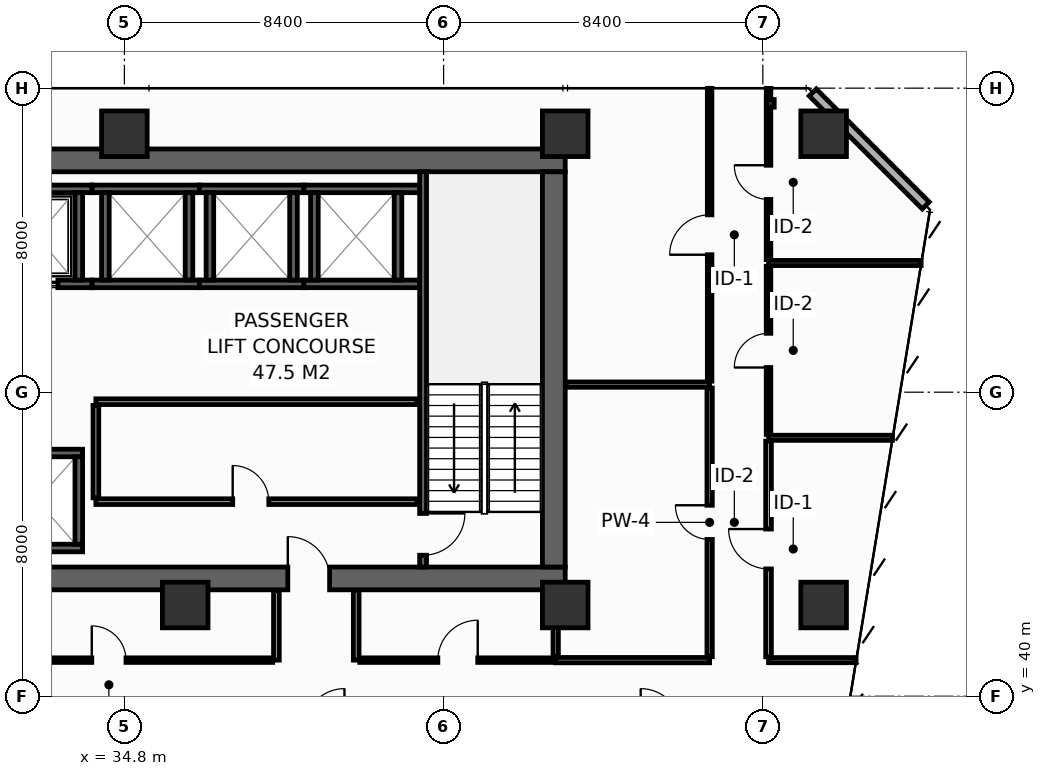
"""IFC4 building model, lengths in metres.
Left out: names, types, materials, properties, quantities, classifications, styles, units other than length and angle.
Written with IfcOpenShell. Run it as: python <this file> out.ifc"""

import sys

from ifc_helpers import new_model, si_unit, direction, frame, frame_2d, origin, origin_2d, place, context, subcontext, project, spatial, rectangle, hollow_rectangle, extrude, element, fill, save


model = new_model("IFC4")
c1 = context("Model", 3, precision=1e-05, world=origin(), true_north=direction((0.0, 1.0)))
c2 = subcontext(c1, "Body", "Model", "MODEL_VIEW")
j1 = project(units=[si_unit("LENGTHUNIT", "METRE"), si_unit("PLANEANGLEUNIT", "RADIAN")], contexts=[c1])
p1 = place(None, origin())
s1 = spatial("IfcSite", under=j1, at=p1, CompositionType="ELEMENT")
p2 = place(p1, origin())
s2 = spatial("IfcBuilding", under=s1, at=p2, CompositionType="ELEMENT")
p3 = place(p2, frame((0.0, 0.0, 42.8)))
s3 = spatial("IfcBuildingStorey", under=s2, at=p3, CompositionType="ELEMENT", Elevation=42.8)
p4 = place(p3, frame((13.5, 43.1, 0.0), z_axis=(0.0, 0.0, 1.0), x_axis=(1.0, 0.0, 0.0)))
e1 = element("IfcWall", 1, at=p4, inside=s3, PredefinedType="SHEAR", context=c2, shape_type="SweptSolid", body=[
    extrude(rectangle(XDim=32.9, YDim=0.6, at=frame_2d((16.45, 0.0))), origin(), (0.0, 0.0, 1.0), 4.15),
])
p5 = place(p4, frame((5.4, 0.0, 0.0)))
e2 = element("IfcOpeningElement", 2, at=p5, cuts=e1, PredefinedType="OPENING", context=c2, shape_type="SweptSolid", body=[
    extrude(rectangle(XDim=1.1, YDim=2.15, at=frame_2d((0.55, 1.075))), frame((0.0, 0.31, 0.0), z_axis=(0.0, -1.0, 0.0), x_axis=(1.0, 0.0, 0.0)), (0.0, 0.0, 1.0), 0.62),
])
p6 = place(p4, frame((25.6, 0.0, 0.0)))
e3 = element("IfcOpeningElement", 3, at=p6, cuts=e1, PredefinedType="OPENING", context=c2, shape_type="SweptSolid", body=[
    extrude(rectangle(XDim=1.1, YDim=2.15, at=frame_2d((0.55, 1.075))), frame((0.0, 0.31, 0.0), z_axis=(0.0, -1.0, 0.0), x_axis=(1.0, 0.0, 0.0)), (0.0, 0.0, 1.0), 0.62),
])
p7 = place(p3, frame((13.5, 54.1, 0.0), z_axis=(0.0, 0.0, 1.0), x_axis=(1.0, 0.0, 0.0)))
e4 = element("IfcWall", 4, at=p7, inside=s3, PredefinedType="SHEAR", context=c2, shape_type="SweptSolid", body=[
    extrude(rectangle(XDim=32.9, YDim=0.6, at=frame_2d((16.45, 0.0))), origin(), (0.0, 0.0, 1.0), 4.15),
])
p8 = place(p3, frame((46.1, 43.4, 0.0), z_axis=(0.0, 0.0, 1.0), x_axis=(0.0, 1.0, 0.0)))
e5 = element("IfcWall", 5, at=p8, inside=s3, PredefinedType="SHEAR", context=c2, shape_type="SweptSolid", body=[
    extrude(rectangle(XDim=10.4, YDim=0.6, at=frame_2d((5.2, 0.0))), origin(), (0.0, 0.0, 1.0), 4.15),
])
for number, where, z_axis, x_axis in (
    (6, (34.8, 54.8, 0.0), (0.0, 0.0, 1.0), (1.0, 0.0, 0.0)),
    (7, (46.4, 54.8, 0.0), (0.0, 0.0, 1.0), (1.0, 0.0, 0.0)),
    (8, (53.2, 54.8, 0.0), (0.0, 0.0, 1.0), (1.0, 0.0, 0.0)),
    (9, (36.4, 42.4, 0.0), (0.0, 0.0, 1.0), (1.0, 0.0, 0.0)),
    (10, (46.4, 42.4, 0.0), (0.0, 0.0, 1.0), (1.0, 0.0, 0.0)),
    (11, (53.2, 42.4, 0.0), (0.0, 0.0, 1.0), (1.0, 0.0, 0.0)),
):
    element("IfcColumn", number, at=place(p3, frame(where, z_axis=z_axis, x_axis=x_axis)), inside=s3, PredefinedType="COLUMN", context=c2, shape_type="SweptSolid", body=[
        extrude(hollow_rectangle(XDim=1.2, YDim=1.2, WallThickness=0.055, at=origin_2d()), origin(), (0.0, 0.0, 1.0), 4.4),
    ])
p9 = place(p3, frame((51.8, 55.6, 0.0), z_axis=(0.0, 0.0, 1.0), x_axis=(1.0, 0.0, 0.0)))
e12 = element("IfcColumn", 12, at=p9, inside=s3, PredefinedType="PILASTER", context=c2, shape_type="SweptSolid", body=[
    extrude(hollow_rectangle(XDim=0.2, YDim=0.2, WallThickness=0.01, at=origin_2d()), origin(), (0.0, 0.0, 1.0), 4.4),
])
p10 = place(p3, frame((31.125, 50.85, 0.0), z_axis=(0.0, 0.0, 1.0), x_axis=(1.0, 0.0, 0.0)))
e13 = element("IfcWall", 13, at=p10, inside=s3, PredefinedType="SHEAR", context=c2, shape_type="SweptSolid", body=[
    extrude(rectangle(XDim=2.825, YDim=0.2, at=frame_2d((1.413, 0.0))), origin(), (0.0, 0.0, 1.0), 4.15),
])
p11 = place(p10, frame((0.825, 0.0, 0.0)))
e14 = element("IfcOpeningElement", 14, at=p11, cuts=e13, PredefinedType="OPENING", context=c2, shape_type="SweptSolid", body=[
    extrude(rectangle(XDim=1.1, YDim=2.2, at=frame_2d((0.55, 1.1))), frame((0.0, 0.11, 0.0), z_axis=(0.0, -1.0, 0.0), x_axis=(1.0, 0.0, 0.0)), (0.0, 0.0, 1.0), 0.22),
])
p12 = place(p3, frame((31.125, 53.35, 0.0), z_axis=(0.0, 0.0, 1.0), x_axis=(1.0, 0.0, 0.0)))
e15 = element("IfcWall", 15, at=p12, inside=s3, PredefinedType="SHEAR", context=c2, shape_type="SweptSolid", body=[
    extrude(rectangle(XDim=2.825, YDim=0.2, at=frame_2d((1.413, 0.0))), origin(), (0.0, 0.0, 1.0), 4.15),
])
p13 = place(p3, frame((33.6, 50.95, 0.0), z_axis=(0.0, 0.0, 1.0), x_axis=(0.0, 1.0, 0.0)))
e16 = element("IfcWall", 16, at=p13, inside=s3, PredefinedType="SHEAR", context=c2, shape_type="SweptSolid", body=[
    extrude(rectangle(XDim=2.3, YDim=0.2, at=frame_2d((1.15, 0.0))), origin(), (0.0, 0.0, 1.0), 4.15),
])
for number, where, z_axis, x_axis in (
    (17, (31.125, 43.9, 0.0), (0.0, 0.0, 1.0), (1.0, 0.0, 0.0)),
    (18, (31.125, 46.4, 0.0), (0.0, 0.0, 1.0), (1.0, 0.0, 0.0)),
):
    element("IfcWall", number, at=place(p3, frame(where, z_axis=z_axis, x_axis=x_axis)), inside=s3, PredefinedType="SHEAR", context=c2, shape_type="SweptSolid", body=[
        extrude(rectangle(XDim=2.575, YDim=0.2, at=frame_2d((1.288, 0.0))), origin(), (0.0, 0.0, 1.0), 4.15),
    ])
p14 = place(p3, frame((33.6, 44.0, 0.0), z_axis=(0.0, 0.0, 1.0), x_axis=(0.0, 1.0, 0.0)))
e19 = element("IfcWall", 19, at=p14, inside=s3, PredefinedType="SHEAR", context=c2, shape_type="SweptSolid", body=[
    extrude(rectangle(XDim=2.3, YDim=0.2, at=frame_2d((1.15, 0.0))), origin(), (0.0, 0.0, 1.0), 4.15),
])
for number, where, z_axis, x_axis in (
    (20, (33.95, 50.85, 0.0), (0.0, 0.0, 1.0), (1.0, 0.0, 0.0)),
    (21, (33.95, 53.35, 0.0), (0.0, 0.0, 1.0), (1.0, 0.0, 0.0)),
):
    element("IfcWall", number, at=place(p3, frame(where, z_axis=z_axis, x_axis=x_axis)), inside=s3, PredefinedType="SHEAR", context=c2, shape_type="SweptSolid", body=[
        extrude(rectangle(XDim=2.825, YDim=0.2, at=frame_2d((1.413, 0.0))), origin(), (0.0, 0.0, 1.0), 4.15),
    ])
for number, where, z_axis, x_axis in (
    (22, (34.3, 50.95, 0.0), (0.0, 0.0, 1.0), (0.0, 1.0, 0.0)),
    (23, (36.5, 50.95, 0.0), (0.0, 0.0, 1.0), (0.0, 1.0, 0.0)),
):
    element("IfcWall", number, at=place(p3, frame(where, z_axis=z_axis, x_axis=x_axis)), inside=s3, PredefinedType="SHEAR", context=c2, shape_type="SweptSolid", body=[
        extrude(rectangle(XDim=2.3, YDim=0.2, at=frame_2d((1.15, 0.0))), origin(), (0.0, 0.0, 1.0), 4.15),
    ])
for number, where, z_axis, x_axis in (
    (24, (36.775, 50.85, 0.0), (0.0, 0.0, 1.0), (1.0, 0.0, 0.0)),
    (25, (36.775, 53.35, 0.0), (0.0, 0.0, 1.0), (1.0, 0.0, 0.0)),
):
    element("IfcWall", number, at=place(p3, frame(where, z_axis=z_axis, x_axis=x_axis)), inside=s3, PredefinedType="SHEAR", context=c2, shape_type="SweptSolid", body=[
        extrude(rectangle(XDim=2.75, YDim=0.2, at=frame_2d((1.375, 0.0))), origin(), (0.0, 0.0, 1.0), 4.15),
    ])
for number, where, z_axis, x_axis in (
    (26, (37.05, 50.95, 0.0), (0.0, 0.0, 1.0), (0.0, 1.0, 0.0)),
    (27, (39.25, 50.95, 0.0), (0.0, 0.0, 1.0), (0.0, 1.0, 0.0)),
):
    element("IfcWall", number, at=place(p3, frame(where, z_axis=z_axis, x_axis=x_axis)), inside=s3, PredefinedType="SHEAR", context=c2, shape_type="SweptSolid", body=[
        extrude(rectangle(XDim=2.3, YDim=0.2, at=frame_2d((1.15, 0.0))), origin(), (0.0, 0.0, 1.0), 4.15),
    ])
for number, where, z_axis, x_axis in (
    (28, (39.525, 50.85, 0.0), (0.0, 0.0, 1.0), (1.0, 0.0, 0.0)),
    (29, (39.525, 53.35, 0.0), (0.0, 0.0, 1.0), (1.0, 0.0, 0.0)),
):
    element("IfcWall", number, at=place(p3, frame(where, z_axis=z_axis, x_axis=x_axis)), inside=s3, PredefinedType="SHEAR", context=c2, shape_type="SweptSolid", body=[
        extrude(rectangle(XDim=3.045, YDim=0.2, at=frame_2d((1.522, 0.0))), origin(), (0.0, 0.0, 1.0), 4.15),
    ])
for number, where, z_axis, x_axis in (
    (30, (39.8, 50.95, 0.0), (0.0, 0.0, 1.0), (0.0, 1.0, 0.0)),
    (31, (42.0, 50.95, 0.0), (0.0, 0.0, 1.0), (0.0, 1.0, 0.0)),
):
    element("IfcWall", number, at=place(p3, frame(where, z_axis=z_axis, x_axis=x_axis)), inside=s3, PredefinedType="SHEAR", context=c2, shape_type="SweptSolid", body=[
        extrude(rectangle(XDim=2.3, YDim=0.2, at=frame_2d((1.15, 0.0))), origin(), (0.0, 0.0, 1.0), 4.15),
    ])
p15 = place(p3, frame((42.66, 53.8, 0.0), z_axis=(0.0, 0.0, 1.0), x_axis=(0.0, -1.0, 0.0)))
e32 = element("IfcWall", 32, at=p15, inside=s3, PredefinedType="SHEAR", context=c2, shape_type="SweptSolid", body=[
    extrude(rectangle(XDim=10.4, YDim=0.18, at=frame_2d((5.2, 0.0))), origin(), (0.0, 0.0, 1.0), 4.15),
])
p16 = place(p15, frame((8.99, 0.0, 0.0)))
e33 = element("IfcOpeningElement", 33, at=p16, cuts=e32, PredefinedType="OPENING", context=c2, shape_type="SweptSolid", body=[
    extrude(rectangle(XDim=1.1, YDim=2.15, at=frame_2d((0.55, 1.075))), frame((0.0, 0.1, 0.0), z_axis=(0.0, -1.0, 0.0), x_axis=(1.0, 0.0, 0.0)), (0.0, 0.0, 1.0), 0.2),
])
p17 = place(p3, frame((34.05, 45.12, 0.0), z_axis=(0.0, 0.0, 1.0), x_axis=(1.0, 0.0, 0.0)))
e34 = element("IfcWall", 34, at=p17, inside=s3, PredefinedType="PARTITIONING", context=c2, shape_type="SweptSolid", body=[
    extrude(rectangle(XDim=8.45, YDim=0.15, at=frame_2d((4.225, 0.0))), origin(), (0.0, 0.0, 1.0), 4.15),
])
p18 = place(p17, frame((3.6, 0.0, 0.0)))
e35 = element("IfcOpeningElement", 35, at=p18, cuts=e34, PredefinedType="OPENING", context=c2, shape_type="SweptSolid", body=[
    extrude(rectangle(XDim=0.95, YDim=2.15, at=frame_2d((0.475, 1.075))), frame((0.0, 0.085, 0.0), z_axis=(0.0, -1.0, 0.0), x_axis=(1.0, 0.0, 0.0)), (0.0, 0.0, 1.0), 0.17),
])
p19 = place(p3, frame((34.05, 47.75, 0.0), z_axis=(0.0, 0.0, 1.0), x_axis=(1.0, 0.0, 0.0)))
e36 = element("IfcWall", 36, at=p19, inside=s3, PredefinedType="PARTITIONING", context=c2, shape_type="SweptSolid", body=[
    extrude(rectangle(XDim=8.45, YDim=0.15, at=frame_2d((4.225, 0.0))), origin(), (0.0, 0.0, 1.0), 4.15),
])
p20 = place(p3, frame((34.05, 45.22, 0.0), z_axis=(0.0, 0.0, 1.0), x_axis=(0.0, 1.0, 0.0)))
e37 = element("IfcWall", 37, at=p20, inside=s3, PredefinedType="PARTITIONING", context=c2, shape_type="SweptSolid", body=[
    extrude(rectangle(XDim=2.43, YDim=0.15, at=frame_2d((1.215, 0.0))), origin(), (0.0, 0.0, 1.0), 4.15),
])
p21 = place(p3, frame((55.887, 52.913, 0.0), z_axis=(0.0, 0.0, 1.0), x_axis=(-0.707106781187, 0.707106781187, 0.0)))
e38 = element("IfcWall", 38, at=p21, inside=s3, PredefinedType="STANDARD", context=c2, shape_type="SweptSolid", body=[
    extrude(rectangle(XDim=4.206, YDim=0.26, at=frame_2d((2.103, 0.0))), origin(), (0.0, 0.0, 1.0), 4.15),
])
p22 = place(p3, frame((46.15, 40.95, 0.0), z_axis=(0.0, 0.0, 1.0), x_axis=(1.0, 0.0, 0.0)))
e39 = element("IfcWall", 39, at=p22, inside=s3, PredefinedType="PARTITIONING", context=c2, shape_type="SweptSolid", body=[
    extrude(rectangle(XDim=4.05, YDim=0.14, at=frame_2d((2.025, 0.0))), origin(), (0.0, 0.0, 1.0), 4.15),
])
p23 = place(p3, frame((46.15, 41.04, 0.0), z_axis=(0.0, 0.0, 1.0), x_axis=(0.0, 1.0, 0.0)))
e40 = element("IfcWall", 40, at=p23, inside=s3, PredefinedType="PARTITIONING", context=c2, shape_type="SweptSolid", body=[
    extrude(rectangle(XDim=1.74, YDim=0.14, at=frame_2d((0.87, 0.0))), origin(), (0.0, 0.0, 1.0), 4.15),
])
p24 = place(p3, frame((46.42, 48.2, 0.0), z_axis=(0.0, 0.0, 1.0), x_axis=(1.0, 0.0, 0.0)))
e41 = element("IfcWall", 41, at=p24, inside=s3, PredefinedType="PARTITIONING", context=c2, shape_type="SweptSolid", body=[
    extrude(rectangle(XDim=3.78, YDim=0.14, at=frame_2d((1.89, 0.0))), origin(), (0.0, 0.0, 1.0), 4.15),
])
p25 = place(p3, frame((50.2, 41.04, 0.0), z_axis=(0.0, 0.0, 1.0), x_axis=(0.0, 1.0, 0.0)))
e42 = element("IfcWall", 42, at=p25, inside=s3, PredefinedType="PARTITIONING", context=c2, shape_type="SweptSolid", body=[
    extrude(rectangle(XDim=7.07, YDim=0.14, at=frame_2d((3.535, 0.0))), origin(), (0.0, 0.0, 1.0), 3.335),
])
p26 = place(p25, frame((3.085, 0.0, 0.0)))
e43 = element("IfcOpeningElement", 43, at=p26, cuts=e42, PredefinedType="OPENING", context=c2, shape_type="SweptSolid", body=[
    extrude(rectangle(XDim=0.9, YDim=2.1, at=frame_2d((0.45, 1.05))), frame((0.0, 0.08, 0.0), z_axis=(0.0, -1.0, 0.0), x_axis=(1.0, 0.0, 0.0)), (0.0, 0.0, 1.0), 0.16),
])
p27 = place(p3, frame((50.2, 48.29, 0.0), z_axis=(0.0, 0.0, 1.0), x_axis=(0.0, 1.0, 0.0)))
e44 = element("IfcWall", 44, at=p27, inside=s3, PredefinedType="PARTITIONING", context=c2, shape_type="SweptSolid", body=[
    extrude(rectangle(XDim=7.705, YDim=0.12, at=frame_2d((3.853, 0.0))), origin(), (0.0, 0.0, 1.0), 3.435),
])
p28 = place(p27, frame((3.327, 0.0, 0.0)))
e45 = element("IfcOpeningElement", 45, at=p28, cuts=e44, PredefinedType="OPENING", context=c2, shape_type="SweptSolid", body=[
    extrude(rectangle(XDim=1.05, YDim=2.15, at=frame_2d((0.525, 1.075))), frame((0.0, 0.07, 0.0), z_axis=(0.0, -1.0, 0.0), x_axis=(1.0, 0.0, 0.0)), (0.0, 0.0, 1.0), 0.14),
])
p29 = place(p3, frame((51.75, 40.95, 0.0), z_axis=(0.0, 0.0, 1.0), x_axis=(1.0, 0.0, 0.0)))
e46 = element("IfcWall", 46, at=p29, inside=s3, PredefinedType="PARTITIONING", context=c2, shape_type="SweptSolid", body=[
    extrude(rectangle(XDim=2.303, YDim=0.135, at=frame_2d((1.151, 0.0))), origin(), (0.0, 0.0, 1.0), 3.635),
])
p30 = place(p3, frame((51.75, 46.8, 0.0), z_axis=(0.0, 0.0, 1.0), x_axis=(1.0, 0.0, 0.0)))
e47 = element("IfcWall", 47, at=p30, inside=s3, PredefinedType="PARTITIONING", context=c2, shape_type="SweptSolid", body=[
    extrude(rectangle(XDim=3.262, YDim=0.135, at=frame_2d((1.631, 0.0))), origin(), (0.0, 0.0, 1.0), 3.335),
])
p31 = place(p3, frame((51.75, 51.4, 0.0), z_axis=(0.0, 0.0, 1.0), x_axis=(1.0, 0.0, 0.0)))
e48 = element("IfcWall", 48, at=p31, inside=s3, PredefinedType="PARTITIONING", context=c2, shape_type="SweptSolid", body=[
    extrude(rectangle(XDim=4.015, YDim=0.135, at=frame_2d((2.008, 0.0))), origin(), (0.0, 0.0, 1.0), 3.335),
])
p32 = place(p3, frame((51.75, 41.038, 0.0), z_axis=(0.0, 0.0, 1.0), x_axis=(0.0, 1.0, 0.0)))
e49 = element("IfcWall", 49, at=p32, inside=s3, PredefinedType="PARTITIONING", context=c2, shape_type="SweptSolid", body=[
    extrude(rectangle(XDim=5.675, YDim=0.15, at=frame_2d((2.837, 0.0))), origin(), (0.0, 0.0, 1.0), 3.335),
])
p33 = place(p32, frame((2.312, 0.0, 0.0)))
e50 = element("IfcOpeningElement", 50, at=p33, cuts=e49, PredefinedType="OPENING", context=c2, shape_type="SweptSolid", body=[
    extrude(rectangle(XDim=1.05, YDim=2.15, at=frame_2d((0.525, 1.075))), frame((0.0, 0.085, 0.0), z_axis=(0.0, -1.0, 0.0), x_axis=(1.0, 0.0, 0.0)), (0.0, 0.0, 1.0), 0.17),
])
p34 = place(p3, frame((51.75, 46.887, 0.0), z_axis=(0.0, 0.0, 1.0), x_axis=(0.0, 1.0, 0.0)))
e51 = element("IfcWall", 51, at=p34, inside=s3, PredefinedType="PARTITIONING", context=c2, shape_type="SweptSolid", body=[
    extrude(rectangle(XDim=4.425, YDim=0.12, at=frame_2d((2.212, 0.0))), origin(), (0.0, 0.0, 1.0), 4.15),
])
p35 = place(p34, frame((1.762, 0.0, 0.0)))
e52 = element("IfcOpeningElement", 52, at=p35, cuts=e51, PredefinedType="OPENING", context=c2, shape_type="SweptSolid", body=[
    extrude(rectangle(XDim=0.9, YDim=2.1, at=frame_2d((0.45, 1.05))), frame((0.0, 0.07, 0.0), z_axis=(0.0, -1.0, 0.0), x_axis=(1.0, 0.0, 0.0)), (0.0, 0.0, 1.0), 0.14),
])
p36 = place(p3, frame((51.75, 51.488, 0.0), z_axis=(0.0, 0.0, 1.0), x_axis=(0.0, 1.0, 0.0)))
e53 = element("IfcWall", 53, at=p36, inside=s3, PredefinedType="PARTITIONING", context=c2, shape_type="SweptSolid", body=[
    extrude(rectangle(XDim=4.508, YDim=0.12, at=frame_2d((2.254, 0.0))), origin(), (0.0, 0.0, 1.0), 3.435),
])
p37 = place(p36, frame((1.584, 0.0, 0.0)))
e54 = element("IfcOpeningElement", 54, at=p37, cuts=e53, PredefinedType="OPENING", context=c2, shape_type="SweptSolid", body=[
    extrude(rectangle(XDim=0.9, YDim=2.1, at=frame_2d((0.45, 1.05))), frame((0.0, 0.07, 0.0), z_axis=(0.0, -1.0, 0.0), x_axis=(1.0, 0.0, 0.0)), (0.0, 0.0, 1.0), 0.14),
])
for number, where, z_axis, x_axis in (
    (55, (38.8, 40.95, 0.0), (0.0, 0.0, 1.0), (0.0, 1.0, 0.0)),
    (56, (40.9, 40.95, 0.0), (0.0, 0.0, 1.0), (0.0, 1.0, 0.0)),
):
    element("IfcWall", number, at=place(p3, frame(where, z_axis=z_axis, x_axis=x_axis)), inside=s3, PredefinedType="PARTITIONING", context=c2, shape_type="SweptSolid", body=[
        extrude(rectangle(XDim=1.83, YDim=0.15, at=frame_2d((0.915, 0.0))), origin(), (0.0, 0.0, 1.0), 4.15),
    ])
p38 = place(p3, frame((30.08, 40.95, 0.0), z_axis=(0.0, 0.0, 1.0), x_axis=(1.0, 0.0, 0.0)))
e57 = element("IfcWall", 57, at=p38, inside=s3, PredefinedType="PARTITIONING", context=c2, shape_type="SweptSolid", body=[
    extrude(rectangle(XDim=8.625, YDim=0.12, at=frame_2d((4.312, 0.0))), origin(), (0.0, 0.0, 1.0), 3.335),
])
p39 = place(p38, frame((3.862, 0.0, 0.0)))
e58 = element("IfcOpeningElement", 58, at=p39, cuts=e57, PredefinedType="OPENING", context=c2, shape_type="SweptSolid", body=[
    extrude(rectangle(XDim=0.9, YDim=2.1, at=frame_2d((0.45, 1.05))), frame((0.0, 0.07, 0.0), z_axis=(0.0, -1.0, 0.0), x_axis=(1.0, 0.0, 0.0)), (0.0, 0.0, 1.0), 0.14),
])
p40 = place(p3, frame((40.995, 40.95, 0.0), z_axis=(0.0, 0.0, 1.0), x_axis=(1.0, 0.0, 0.0)))
e59 = element("IfcWall", 59, at=p40, inside=s3, PredefinedType="PARTITIONING", context=c2, shape_type="SweptSolid", body=[
    extrude(rectangle(XDim=5.155, YDim=0.12, at=frame_2d((2.577, 0.0))), origin(), (0.0, 0.0, 1.0), 4.15),
])
p41 = place(p40, frame((2.053, 0.0, 0.0)))
e60 = element("IfcOpeningElement", 60, at=p41, cuts=e59, PredefinedType="OPENING", context=c2, shape_type="SweptSolid", body=[
    extrude(rectangle(XDim=1.05, YDim=2.15, at=frame_2d((0.525, 1.075))), frame((0.0, 0.07, 0.0), z_axis=(0.0, -1.0, 0.0), x_axis=(1.0, 0.0, 0.0)), (0.0, 0.0, 1.0), 0.14),
])
p42 = place(p11, origin())
e61 = element("IfcDoor", 61, at=p42, inside=s3, OperationType="SLIDING_TO_LEFT", PredefinedType="DOOR", context=c2, shape_type="SweptSolid", body=[
    extrude(rectangle(XDim=1.1, YDim=2.2, at=frame_2d((0.55, 1.1))), frame((0.0, 0.025, 0.0), z_axis=(0.0, -1.0, 0.0), x_axis=(1.0, 0.0, 0.0)), (0.0, 0.0, 1.0), 0.05),
])
fill(e14, e61)
p43 = place(p16, origin())
e62 = element("IfcDoor", 62, at=p43, inside=s3, OperationType="SINGLE_SWING_LEFT", PredefinedType="DOOR", context=c2, shape_type="SweptSolid", body=[
    extrude(rectangle(XDim=1.1, YDim=2.15, at=frame_2d((0.55, 1.075))), frame((0.0, 0.025, 0.0), z_axis=(0.0, -1.0, 0.0), x_axis=(1.0, 0.0, 0.0)), (0.0, 0.0, 1.0), 0.05),
])
fill(e33, e62)
p44 = place(p6, origin())
e63 = element("IfcDoor", 63, at=p44, inside=s3, OperationType="SINGLE_SWING_LEFT", PredefinedType="DOOR", context=c2, shape_type="SweptSolid", body=[
    extrude(rectangle(XDim=1.1, YDim=2.15, at=frame_2d((0.55, 1.075))), frame((0.0, 0.025, 0.0), z_axis=(0.0, -1.0, 0.0), x_axis=(1.0, 0.0, 0.0)), (0.0, 0.0, 1.0), 0.05),
])
fill(e3, e63)
p45 = place(p18, origin())
e64 = element("IfcDoor", 64, at=p45, inside=s3, OperationType="SINGLE_SWING_LEFT", PredefinedType="DOOR", context=c2, shape_type="SweptSolid", body=[
    extrude(rectangle(XDim=0.95, YDim=2.15, at=frame_2d((0.475, 1.075))), frame((0.0, 0.025, 0.0), z_axis=(0.0, -1.0, 0.0), x_axis=(1.0, 0.0, 0.0)), (0.0, 0.0, 1.0), 0.05),
])
fill(e35, e64)
p46 = place(p26, origin())
e65 = element("IfcDoor", 65, at=p46, inside=s3, OperationType="SINGLE_SWING_RIGHT", PredefinedType="DOOR", context=c2, shape_type="SweptSolid", body=[
    extrude(rectangle(XDim=0.9, YDim=2.1, at=frame_2d((0.45, 1.05))), frame((0.0, 0.025, 0.0), z_axis=(0.0, -1.0, 0.0), x_axis=(1.0, 0.0, 0.0)), (0.0, 0.0, 1.0), 0.05),
])
fill(e43, e65)
p47 = place(p28, origin())
e66 = element("IfcDoor", 66, at=p47, inside=s3, OperationType="SINGLE_SWING_LEFT", PredefinedType="DOOR", context=c2, shape_type="SweptSolid", body=[
    extrude(rectangle(XDim=1.05, YDim=2.15, at=frame_2d((0.525, 1.075))), frame((0.0, 0.025, 0.0), z_axis=(0.0, -1.0, 0.0), x_axis=(1.0, 0.0, 0.0)), (0.0, 0.0, 1.0), 0.05),
])
fill(e45, e66)
p48 = place(p33, origin())
e67 = element("IfcDoor", 67, at=p48, inside=s3, OperationType="SINGLE_SWING_RIGHT", PredefinedType="DOOR", context=c2, shape_type="SweptSolid", body=[
    extrude(rectangle(XDim=1.05, YDim=2.15, at=frame_2d((0.525, 1.075))), frame((0.0, 0.025, 0.0), z_axis=(0.0, -1.0, 0.0), x_axis=(1.0, 0.0, 0.0)), (0.0, 0.0, 1.0), 0.05),
])
fill(e50, e67)
p49 = place(p35, origin())
e68 = element("IfcDoor", 68, at=p49, inside=s3, OperationType="SINGLE_SWING_LEFT", PredefinedType="DOOR", context=c2, shape_type="SweptSolid", body=[
    extrude(rectangle(XDim=0.9, YDim=2.1, at=frame_2d((0.45, 1.05))), frame((0.0, 0.025, 0.0), z_axis=(0.0, -1.0, 0.0), x_axis=(1.0, 0.0, 0.0)), (0.0, 0.0, 1.0), 0.05),
])
fill(e52, e68)
p50 = place(p37, origin())
e69 = element("IfcDoor", 69, at=p50, inside=s3, OperationType="SINGLE_SWING_RIGHT", PredefinedType="DOOR", context=c2, shape_type="SweptSolid", body=[
    extrude(rectangle(XDim=0.9, YDim=2.1, at=frame_2d((0.45, 1.05))), frame((0.0, 0.025, 0.0), z_axis=(0.0, -1.0, 0.0), x_axis=(1.0, 0.0, 0.0)), (0.0, 0.0, 1.0), 0.05),
])
fill(e54, e69)
p51 = place(p39, origin())
e70 = element("IfcDoor", 70, at=p51, inside=s3, OperationType="SINGLE_SWING_LEFT", PredefinedType="DOOR", context=c2, shape_type="SweptSolid", body=[
    extrude(rectangle(XDim=0.9, YDim=2.1, at=frame_2d((0.45, 1.05))), frame((0.0, 0.025, 0.0), z_axis=(0.0, -1.0, 0.0), x_axis=(1.0, 0.0, 0.0)), (0.0, 0.0, 1.0), 0.05),
])
fill(e58, e70)
p52 = place(p41, origin())
e71 = element("IfcDoor", 71, at=p52, inside=s3, OperationType="SINGLE_SWING_RIGHT", PredefinedType="DOOR", context=c2, shape_type="SweptSolid", body=[
    extrude(rectangle(XDim=1.05, YDim=2.15, at=frame_2d((0.525, 1.075))), frame((0.0, 0.025, 0.0), z_axis=(0.0, -1.0, 0.0), x_axis=(1.0, 0.0, 0.0)), (0.0, 0.0, 1.0), 0.05),
])
fill(e60, e71)
save(model, sys.argv[1])
